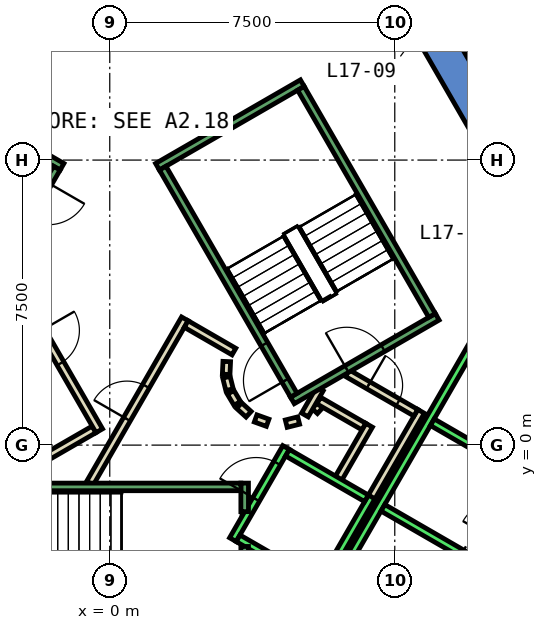
"""IFC4 building model, lengths in metres.
Left out: names, types, materials, properties, quantities, classifications, styles, units other than length and angle.
Written with IfcOpenShell. Run it as: python <this file> out.ifc"""

import sys

from ifc_helpers import new_model, si_unit, direction, frame, frame_2d, origin, place, context, subcontext, project, spatial, polyline, rectangle, outline, extrude, element, fill, save


model = new_model("IFC4")
c1 = context("Model", 3, precision=1e-05, world=origin(), true_north=direction((0.0, 1.0)))
c2 = subcontext(c1, "Body", "Model", "MODEL_VIEW")
j1 = project(units=[si_unit("LENGTHUNIT", "METRE"), si_unit("PLANEANGLEUNIT", "RADIAN")], contexts=[c1])
p1 = place(None, origin())
s1 = spatial("IfcSite", under=j1, at=p1, CompositionType="ELEMENT")
p2 = place(p1, origin())
s2 = spatial("IfcBuilding", under=s1, at=p2, CompositionType="ELEMENT")
p3 = place(p2, frame((0.0, 0.0, 81.2)))
s3 = spatial("IfcBuildingStorey", under=s2, at=p3, CompositionType="ELEMENT", Elevation=81.2)
p4 = place(p3, frame((0.0, 0.0, -0.6)))
e1 = element("IfcWall", 1, at=p4, inside=s3, PredefinedType="SHEAR", context=c2, shape_type="SweptSolid", body=[
    extrude(outline(polyline([(8.517, 11.747), (7.738, 11.298), (12.817, 2.5), (13.856, 2.5), (8.517, 11.747)])), origin(), (0.0, 0.0, 1.0), 5.4),
])
p5 = place(p3, frame((0.0, 0.0, -0.6)))
e2 = element("IfcWall", 2, at=p5, inside=s3, PredefinedType="SHEAR", context=c2, shape_type="SweptSolid", body=[
    extrude(outline(polyline([(10.717, -2.937), (9.938, -2.487), (9.288, -3.613), (10.067, -4.063), (10.717, -2.937)])), origin(), (0.0, 0.0, 1.0), 5.4),
])
p6 = place(p3, frame((5.39, 0.898, 0.0), z_axis=(0.0, 0.0, 1.0), x_axis=(0.673828488714, 0.738887791073, 0.0)))
e3 = element("IfcWall", 3, at=p6, inside=s3, PredefinedType="PARTITIONING", context=c2, shape_type="SweptSolid", body=[
    extrude(rectangle(XDim=0.263, YDim=0.2, at=frame_2d((0.131, 0.0))), origin(), (0.0, 0.0, 1.0), 4.8),
])
p7 = place(p3, frame((5.499, 1.172, 0.0), z_axis=(0.0, 0.0, 1.0), x_axis=(0.866333505267, -0.499465972466, 0.0)))
e4 = element("IfcWall", 4, at=p7, inside=s3, PredefinedType="PARTITIONING", context=c2, shape_type="SweptSolid", body=[
    extrude(rectangle(XDim=1.374, YDim=0.2, at=frame_2d((0.687, 0.0))), origin(), (0.0, 0.0, 1.0), 4.8),
])
p8 = place(p3, frame((6.826, 0.522, 0.0), z_axis=(0.0, 0.0, 1.0), x_axis=(-0.500016722714, -0.866015748706, 0.0)))
e5 = element("IfcWall", 5, at=p8, inside=s3, PredefinedType="PARTITIONING", context=c2, shape_type="SweptSolid", body=[
    extrude(rectangle(XDim=1.7, YDim=0.2, at=frame_2d((0.85, 0.0))), origin(), (0.0, 0.0, 1.0), 4.8),
])
p9 = place(p3, frame((8.192, 0.888, 0.0), z_axis=(0.0, 0.0, 1.0), x_axis=(-0.499940625693, -0.866059680843, 0.0)))
e6 = element("IfcWall", 6, at=p9, inside=s3, PredefinedType="PARTITIONING", context=c2, shape_type="SweptSolid", body=[
    extrude(rectangle(XDim=2.68, YDim=0.2, at=frame_2d((1.34, 0.0))), origin(), (0.0, 0.0, 1.0), 4.8),
])
p10 = place(p3, frame((5.135, 0.793, 0.0), z_axis=(0.0, 0.0, 1.0), x_axis=(0.499526442893, 0.866298639529, 0.0)))
e7 = element("IfcWall", 7, at=p10, inside=s3, PredefinedType="PARTITIONING", context=c2, shape_type="SweptSolid", body=[
    extrude(rectangle(XDim=0.791, YDim=0.2, at=frame_2d((0.396, 0.0))), origin(), (0.0, 0.0, 1.0), 4.8),
])
p11 = place(p3, frame((6.25, 1.894, 0.0), z_axis=(0.0, 0.0, 1.0), x_axis=(0.866043184279, -0.499969202016, 0.0)))
e8 = element("IfcWall", 8, at=p11, inside=s3, PredefinedType="PARTITIONING", context=c2, shape_type="SweptSolid", body=[
    extrude(rectangle(XDim=2.084, YDim=0.2, at=frame_2d((1.042, 0.0))), origin(), (0.0, 0.0, 1.0), 4.8),
])
p12 = place(p11, frame((0.642, 0.0, 0.0)))
e9 = element("IfcOpeningElement", 9, at=p12, cuts=e8, PredefinedType="OPENING", context=c2, shape_type="SweptSolid", body=[
    extrude(rectangle(XDim=0.9, YDim=2.1, at=frame_2d((0.45, 1.05))), frame((0.0, 0.11, 0.0), z_axis=(0.0, -1.0, 0.0), x_axis=(1.0, 0.0, 0.0)), (0.0, 0.0, 1.0), 0.22),
])
p13 = place(p3, frame((3.079, 2.199, 0.0), z_axis=(0.0, 0.0, 1.0), x_axis=(-0.047771483479, -0.998858290933, 0.0)))
e10 = element("IfcWall", 10, at=p13, inside=s3, PredefinedType="PARTITIONING", context=c2, shape_type="SweptSolid", body=[
    extrude(rectangle(XDim=0.337, YDim=0.2, at=frame_2d((0.169, 0.0))), origin(), (0.0, 0.0, 1.0), 4.8),
])
p14 = place(p3, frame((3.07, 1.786, 0.0), z_axis=(0.0, 0.0, 1.0), x_axis=(0.242705583207, -0.970099994784, 0.0)))
e11 = element("IfcWall", 11, at=p14, inside=s3, PredefinedType="PARTITIONING", context=c2, shape_type="SweptSolid", body=[
    extrude(rectangle(XDim=0.338, YDim=0.2, at=frame_2d((0.169, 0.0))), origin(), (0.0, 0.0, 1.0), 4.8),
])
for number, where, z_axis, x_axis in (
    (12, (3.182, 1.388, 0.0), (0.0, 0.0, 1.0), (0.512, -0.859, 0.0)),
    (13, (3.404, 1.039, 0.0), (0.0, 0.0, 1.0), (0.74, -0.672, 0.0)),
):
    element("IfcWall", number, at=place(p3, frame(where, z_axis=z_axis, x_axis=x_axis)), inside=s3, PredefinedType="PARTITIONING", context=c2, shape_type="SweptSolid", body=[
        extrude(rectangle(XDim=0.338, YDim=0.2, at=frame_2d((0.169, 0.0))), origin(), (0.0, 0.0, 1.0), 4.8),
    ])
p15 = place(p3, frame((3.838, 0.702, 0.0), z_axis=(0.0, 0.0, 1.0), x_axis=(0.941035081519, -0.338308993895, 0.0)))
e14 = element("IfcWall", 14, at=p15, inside=s3, PredefinedType="PARTITIONING", context=c2, shape_type="SweptSolid", body=[
    extrude(rectangle(XDim=0.337, YDim=0.2, at=frame_2d((0.168, 0.0))), origin(), (0.0, 0.0, 1.0), 4.8),
])
p16 = place(p3, frame((4.644, 0.564, 0.0), z_axis=(0.0, 0.0, 1.0), x_axis=(0.969929076366, 0.243387729394, 0.0)))
e15 = element("IfcWall", 15, at=p16, inside=s3, PredefinedType="PARTITIONING", context=c2, shape_type="SweptSolid", body=[
    extrude(rectangle(XDim=0.337, YDim=0.2, at=frame_2d((0.168, 0.0))), origin(), (0.0, 0.0, 1.0), 4.8),
])
p17 = place(p3, frame((-0.52, -1.0, 0.0), z_axis=(0.0, 0.0, 1.0), x_axis=(0.50011622646, 0.865958290007, 0.0)))
e16 = element("IfcWall", 16, at=p17, inside=s3, PredefinedType="PARTITIONING", context=c2, shape_type="SweptSolid", body=[
    extrude(rectangle(XDim=4.991, YDim=0.2, at=frame_2d((2.496, 0.0))), origin(), (0.0, 0.0, 1.0), 4.8),
])
p18 = place(p17, frame((1.945, 0.0, 0.0)))
e17 = element("IfcOpeningElement", 17, at=p18, cuts=e16, PredefinedType="OPENING", context=c2, shape_type="SweptSolid", body=[
    extrude(rectangle(XDim=1.0, YDim=2.1, at=frame_2d((0.5, 1.05))), frame((0.0, 0.11, 0.0), z_axis=(0.0, -1.0, 0.0), x_axis=(1.0, 0.0, 0.0)), (0.0, 0.0, 1.0), 0.22),
])
p19 = place(p3, frame((2.012, 3.186, 0.0), z_axis=(0.0, 0.0, 1.0), x_axis=(0.865891012941, -0.500232699559, 0.0)))
e18 = element("IfcWall", 18, at=p19, inside=s3, PredefinedType="PARTITIONING", context=c2, shape_type="SweptSolid", body=[
    extrude(rectangle(XDim=1.449, YDim=0.2, at=frame_2d((0.725, 0.0))), origin(), (0.0, 0.0, 1.0), 4.8),
])
p20 = place(p3, frame((-0.412, 0.414, 0.0), z_axis=(0.0, 0.0, 1.0), x_axis=(-0.866017369001, -0.500013916395, 0.0)))
e19 = element("IfcWall", 19, at=p20, inside=s3, PredefinedType="PARTITIONING", context=c2, shape_type="SweptSolid", body=[
    extrude(rectangle(XDim=1.45, YDim=0.2, at=frame_2d((0.725, 0.0))), origin(), (0.0, 0.0, 1.0), 4.8),
])
p21 = place(p3, frame((-2.771, 4.7, 0.0), z_axis=(0.0, 0.0, 1.0), x_axis=(0.499969479948, -0.866043023828, 0.0)))
e20 = element("IfcWall", 20, at=p21, inside=s3, PredefinedType="PARTITIONING", context=c2, shape_type="SweptSolid", body=[
    extrude(rectangle(XDim=4.99, YDim=0.2, at=frame_2d((2.495, 0.0))), origin(), (0.0, 0.0, 1.0), 4.8),
])
p22 = place(p21, frame((1.945, 0.0, 0.0)))
e21 = element("IfcOpeningElement", 21, at=p22, cuts=e20, PredefinedType="OPENING", context=c2, shape_type="SweptSolid", body=[
    extrude(rectangle(XDim=1.0, YDim=2.1, at=frame_2d((0.5, 1.05))), frame((0.0, 0.11, 0.0), z_axis=(0.0, -1.0, 0.0), x_axis=(1.0, 0.0, 0.0)), (0.0, 0.0, 1.0), 0.22),
])
p23 = place(p3, frame((3.24, -2.488, 0.0), z_axis=(0.0, 0.0, 1.0), x_axis=(0.49994636267, 0.866056369097, 0.0)))
e22 = element("IfcWall", 22, at=p23, inside=s3, PredefinedType="STANDARD", context=c2, shape_type="SweptSolid", body=[
    extrude(rectangle(XDim=2.8, YDim=0.2, at=frame_2d((1.4, 0.0))), origin(), (0.0, 0.0, 1.0), 4.8),
])
p24 = place(p23, frame((1.225, 0.0, 0.0)))
e23 = element("IfcOpeningElement", 23, at=p24, cuts=e22, PredefinedType="OPENING", context=c2, shape_type="SweptSolid", body=[
    extrude(rectangle(XDim=1.1, YDim=2.1, at=frame_2d((0.55, 1.05))), frame((0.0, 0.11, 0.0), z_axis=(0.0, -1.0, 0.0), x_axis=(1.0, 0.0, 0.0)), (0.0, 0.0, 1.0), 0.22),
])
p25 = place(p3, frame((5.492, -3.788, 0.0), z_axis=(0.0, 0.0, 1.0), x_axis=(0.500011755427, 0.866018616679, 0.0)))
e24 = element("IfcWall", 24, at=p25, inside=s3, PredefinedType="STANDARD", context=c2, shape_type="SweptSolid", body=[
    extrude(rectangle(XDim=2.8, YDim=0.2, at=frame_2d((1.4, 0.0))), origin(), (0.0, 0.0, 1.0), 4.8),
])
p26 = place(p3, frame((3.377, -2.452, 0.0), z_axis=(0.0, 0.0, 1.0), x_axis=(0.865955154139, -0.50012165622, 0.0)))
e25 = element("IfcWall", 25, at=p26, inside=s3, PredefinedType="STANDARD", context=c2, shape_type="SweptSolid", body=[
    extrude(rectangle(XDim=2.4, YDim=0.2, at=frame_2d((1.2, 0.0))), origin(), (0.0, 0.0, 1.0), 4.8),
])
p27 = place(p3, frame((4.677, -0.2, 0.0), z_axis=(0.0, 0.0, 1.0), x_axis=(0.865973769406, -0.500089422704, 0.0)))
e26 = element("IfcWall", 26, at=p27, inside=s3, PredefinedType="STANDARD", context=c2, shape_type="SweptSolid", body=[
    extrude(rectangle(XDim=2.399, YDim=0.2, at=frame_2d((1.2, 0.0))), origin(), (0.0, 0.0, 1.0), 4.8),
])
p28 = place(p3, frame((4.451, -6.19, 0.0), z_axis=(0.0, 0.0, 1.0), x_axis=(0.50000090737, 0.866024879913, 0.0)))
e27 = element("IfcWall", 27, at=p28, inside=s3, PredefinedType="STANDARD", context=c2, shape_type="SweptSolid", body=[
    extrude(rectangle(XDim=10.6, YDim=0.2, at=frame_2d((5.3, 0.0))), origin(), (0.0, 0.0, 1.0), 4.8),
])
for number, where, z_axis, x_axis in (
    (28, (7.188, -1.65, 0.0), (0.0, 0.0, 1.0), (0.866, -0.5, 0.0)),
    (29, (8.488, 0.602, 0.0), (0.0, 0.0, 1.0), (0.866, -0.5, 0.0)),
):
    element("IfcWall", number, at=place(p3, frame(where, z_axis=z_axis, x_axis=x_axis)), inside=s3, PredefinedType="STANDARD", context=c2, shape_type="SweptSolid", body=[
        extrude(rectangle(XDim=2.5, YDim=0.2, at=frame_2d((1.25, 0.0))), origin(), (0.0, 0.0, 1.0), 4.8),
    ])
p29 = place(p3, frame((3.55, -2.667, 0.0), z_axis=(0.0, 0.0, 1.0), x_axis=(0.0, -1.0, 0.0)))
e30 = element("IfcWall", 30, at=p29, inside=s3, PredefinedType="STANDARD", context=c2, shape_type="SweptSolid", body=[
    extrude(rectangle(XDim=2.733, YDim=0.2, at=frame_2d((1.366, 0.0))), origin(), (0.0, 0.0, 1.0), 4.8),
])
p30 = place(p3, frame((3.55, -1.0, 0.0), z_axis=(0.0, 0.0, 1.0), x_axis=(0.0, -1.0, 0.0)))
e31 = element("IfcWall", 31, at=p30, inside=s3, PredefinedType="STANDARD", context=c2, shape_type="SweptSolid", body=[
    extrude(rectangle(XDim=0.751, YDim=0.2, at=frame_2d((0.375, 0.0))), origin(), (0.0, 0.0, 1.0), 4.8),
])
p31 = place(p3, frame((-3.45, -1.1, 0.0), z_axis=(0.0, 0.0, 1.0), x_axis=(1.0, 0.0, 0.0)))
e32 = element("IfcWall", 32, at=p31, inside=s3, PredefinedType="STANDARD", context=c2, shape_type="SweptSolid", body=[
    extrude(rectangle(XDim=6.9, YDim=0.2, at=frame_2d((3.45, 0.0))), origin(), (0.0, 0.0, 1.0), 4.8),
])
p32 = place(p31, frame((0.45, 0.0, 0.0)))
e33 = element("IfcOpeningElement", 33, at=p32, cuts=e32, PredefinedType="OPENING", context=c2, shape_type="SweptSolid", body=[
    extrude(rectangle(XDim=1.1, YDim=2.2, at=frame_2d((0.55, 1.1))), frame((0.0, 0.11, 0.0), z_axis=(0.0, -1.0, 0.0), x_axis=(1.0, 0.0, 0.0)), (0.0, 0.0, 1.0), 0.22),
])
p33 = place(p3, frame((4.806, 1.176, 0.0), z_axis=(0.0, 0.0, 1.0), x_axis=(0.866059941101, 0.499940174841, 0.0)))
e34 = element("IfcWall", 34, at=p33, inside=s3, PredefinedType="STANDARD", context=c2, shape_type="SweptSolid", body=[
    extrude(rectangle(XDim=4.4, YDim=0.2, at=frame_2d((2.2, 0.0))), origin(), (0.0, 0.0, 1.0), 4.8),
])
p34 = place(p33, frame((1.65, 0.0, 0.0)))
e35 = element("IfcOpeningElement", 35, at=p34, cuts=e34, PredefinedType="OPENING", context=c2, shape_type="SweptSolid", body=[
    extrude(rectangle(XDim=1.1, YDim=2.2, at=frame_2d((0.55, 1.1))), frame((0.0, 0.11, 0.0), z_axis=(0.0, -1.0, 0.0), x_axis=(1.0, 0.0, 0.0)), (0.0, 0.0, 1.0), 0.22),
])
p35 = place(p3, frame((1.256, 7.324, 0.0), z_axis=(0.0, 0.0, 1.0), x_axis=(0.866046073146, 0.499964197906, 0.0)))
e36 = element("IfcWall", 36, at=p35, inside=s3, PredefinedType="STANDARD", context=c2, shape_type="SweptSolid", body=[
    extrude(rectangle(XDim=4.4, YDim=0.2, at=frame_2d((2.2, 0.0))), origin(), (0.0, 0.0, 1.0), 4.8),
])
p36 = place(p3, frame((4.843, 1.312, 0.0), z_axis=(0.0, 0.0, 1.0), x_axis=(-0.499963383562, 0.866046543262, 0.0)))
e37 = element("IfcWall", 37, at=p36, inside=s3, PredefinedType="STANDARD", context=c2, shape_type="SweptSolid", body=[
    extrude(rectangle(XDim=6.9, YDim=0.2, at=frame_2d((3.45, 0.0))), origin(), (0.0, 0.0, 1.0), 4.8),
])
p37 = place(p36, frame((0.45, 0.0, 0.0)))
e38 = element("IfcOpeningElement", 38, at=p37, cuts=e37, PredefinedType="OPENING", context=c2, shape_type="SweptSolid", body=[
    extrude(rectangle(XDim=1.1, YDim=2.2, at=frame_2d((0.55, 1.1))), frame((0.0, 0.11, 0.0), z_axis=(0.0, -1.0, 0.0), x_axis=(1.0, 0.0, 0.0)), (0.0, 0.0, 1.0), 0.22),
])
p38 = place(p3, frame((8.48, 3.412, 0.0), z_axis=(0.0, 0.0, 1.0), x_axis=(-0.499978703459, 0.866037698999, 0.0)))
e39 = element("IfcWall", 39, at=p38, inside=s3, PredefinedType="STANDARD", context=c2, shape_type="SweptSolid", body=[
    extrude(rectangle(XDim=6.9, YDim=0.2, at=frame_2d((3.45, 0.0))), origin(), (0.0, 0.0, 1.0), 4.8),
])
p39 = place(p3, frame((-1.256, 7.324, 0.0), z_axis=(0.0, 0.0, 1.0), x_axis=(-0.866046073146, 0.499964197906, 0.0)))
e40 = element("IfcWall", 40, at=p39, inside=s3, PredefinedType="STANDARD", context=c2, shape_type="SweptSolid", body=[
    extrude(rectangle(XDim=4.4, YDim=0.2, at=frame_2d((2.2, 0.0))), origin(), (0.0, 0.0, 1.0), 4.8),
])
p40 = place(p39, frame((1.65, 0.0, 0.0)))
e41 = element("IfcOpeningElement", 41, at=p40, cuts=e40, PredefinedType="OPENING", context=c2, shape_type="SweptSolid", body=[
    extrude(rectangle(XDim=1.1, YDim=2.2, at=frame_2d((0.55, 1.1))), frame((0.0, 0.11, 0.0), z_axis=(0.0, -1.0, 0.0), x_axis=(1.0, 0.0, 0.0)), (0.0, 0.0, 1.0), 0.22),
])
p41 = place(p3, frame((-1.393, 7.288, 0.0), z_axis=(0.0, 0.0, 1.0), x_axis=(-0.499963383562, -0.866046543262, 0.0)))
e42 = element("IfcWall", 42, at=p41, inside=s3, PredefinedType="STANDARD", context=c2, shape_type="SweptSolid", body=[
    extrude(rectangle(XDim=6.9, YDim=0.2, at=frame_2d((3.45, 0.0))), origin(), (0.0, 0.0, 1.0), 4.8),
])
p42 = place(p41, frame((0.45, 0.0, 0.0)))
e43 = element("IfcOpeningElement", 43, at=p42, cuts=e42, PredefinedType="OPENING", context=c2, shape_type="SweptSolid", body=[
    extrude(rectangle(XDim=1.1, YDim=2.2, at=frame_2d((0.55, 1.1))), frame((0.0, 0.11, 0.0), z_axis=(0.0, -1.0, 0.0), x_axis=(1.0, 0.0, 0.0)), (0.0, 0.0, 1.0), 0.22),
])
p43 = place(p18, origin())
e44 = element("IfcDoor", 44, at=p43, inside=s3, OperationType="SINGLE_SWING_LEFT", PredefinedType="DOOR", context=c2, shape_type="SweptSolid", body=[
    extrude(rectangle(XDim=1.0, YDim=2.1, at=frame_2d((0.5, 1.05))), frame((0.0, 0.025, 0.0), z_axis=(0.0, -1.0, 0.0), x_axis=(1.0, 0.0, 0.0)), (0.0, 0.0, 1.0), 0.05),
])
fill(e17, e44)
p44 = place(p22, origin())
e45 = element("IfcDoor", 45, at=p44, inside=s3, OperationType="SINGLE_SWING_RIGHT", PredefinedType="DOOR", context=c2, shape_type="SweptSolid", body=[
    extrude(rectangle(XDim=1.0, YDim=2.1, at=frame_2d((0.5, 1.05))), frame((0.0, 0.025, 0.0), z_axis=(0.0, -1.0, 0.0), x_axis=(1.0, 0.0, 0.0)), (0.0, 0.0, 1.0), 0.05),
])
fill(e21, e45)
p45 = place(p12, origin())
e46 = element("IfcDoor", 46, at=p45, inside=s3, OperationType="SINGLE_SWING_LEFT", PredefinedType="DOOR", context=c2, shape_type="SweptSolid", body=[
    extrude(rectangle(XDim=0.9, YDim=2.1, at=frame_2d((0.45, 1.05))), frame((0.0, 0.025, 0.0), z_axis=(0.0, -1.0, 0.0), x_axis=(1.0, 0.0, 0.0)), (0.0, 0.0, 1.0), 0.05),
])
fill(e9, e46)
p46 = place(p24, origin())
e47 = element("IfcDoor", 47, at=p46, inside=s3, OperationType="SLIDING_TO_LEFT", PredefinedType="DOOR", context=c2, shape_type="SweptSolid", body=[
    extrude(rectangle(XDim=1.1, YDim=2.1, at=frame_2d((0.55, 1.05))), frame((0.0, 0.025, 0.0), z_axis=(0.0, -1.0, 0.0), x_axis=(1.0, 0.0, 0.0)), (0.0, 0.0, 1.0), 0.05),
])
fill(e23, e47)
p47 = place(p37, origin())
e48 = element("IfcDoor", 48, at=p47, inside=s3, OperationType="SINGLE_SWING_LEFT", PredefinedType="DOOR", context=c2, shape_type="SweptSolid", body=[
    extrude(rectangle(XDim=1.1, YDim=2.2, at=frame_2d((0.55, 1.1))), frame((0.0, 0.025, 0.0), z_axis=(0.0, -1.0, 0.0), x_axis=(1.0, 0.0, 0.0)), (0.0, 0.0, 1.0), 0.05),
])
fill(e38, e48)
p48 = place(p34, origin())
e49 = element("IfcDoor", 49, at=p48, inside=s3, OperationType="SINGLE_SWING_LEFT", PredefinedType="DOOR", context=c2, shape_type="SweptSolid", body=[
    extrude(rectangle(XDim=1.1, YDim=2.2, at=frame_2d((0.55, 1.1))), frame((0.0, 0.025, 0.0), z_axis=(0.0, -1.0, 0.0), x_axis=(1.0, 0.0, 0.0)), (0.0, 0.0, 1.0), 0.05),
])
fill(e35, e49)
save(model, sys.argv[1])
